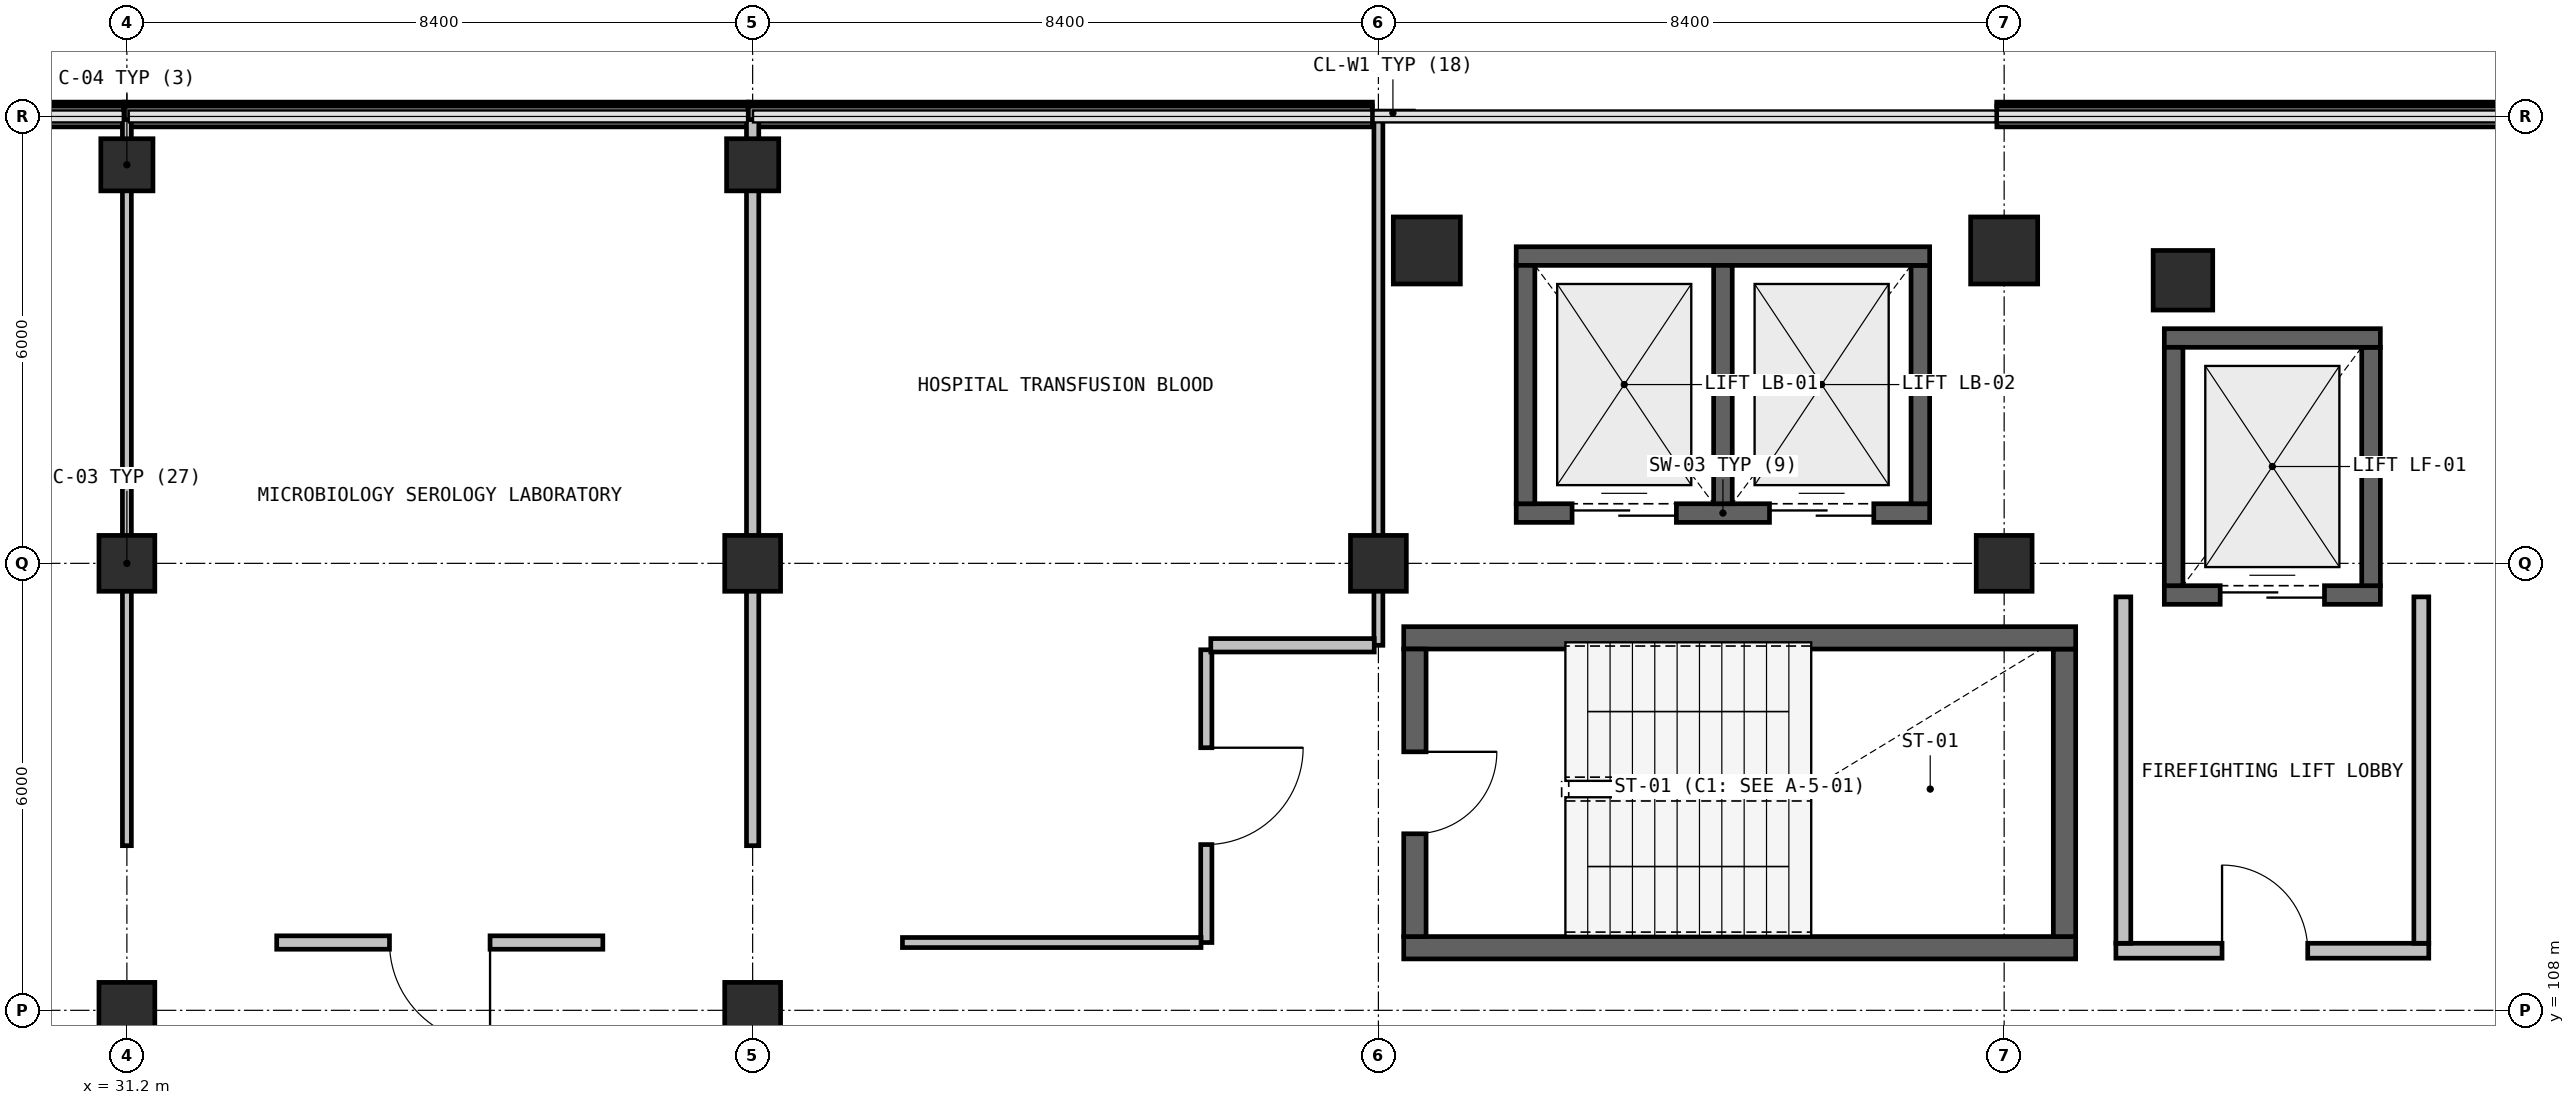
"""IFC4 building model, lengths in metres.
Left out: names, types, materials, properties, quantities, classifications, styles, units other than length and angle.
Written with IfcOpenShell. Run it as: python <this file> out.ifc"""

import sys

from ifc_helpers import new_model, si_unit, direction, frame, frame_2d, origin, origin_2d, place, context, subcontext, project, spatial, rectangle, extrude, element, fill, save


model = new_model("IFC4")
c1 = context("Model", 3, precision=1e-05, world=origin(), true_north=direction((0.0, 1.0)))
c2 = subcontext(c1, "Body", "Model", "MODEL_VIEW")
j1 = project(units=[si_unit("LENGTHUNIT", "METRE"), si_unit("PLANEANGLEUNIT", "RADIAN")], contexts=[c1])
p1 = place(None, origin())
s1 = spatial("IfcSite", under=j1, at=p1, CompositionType="ELEMENT")
p2 = place(p1, origin())
s2 = spatial("IfcBuilding", under=s1, at=p2, CompositionType="ELEMENT")
p3 = place(p2, frame((0.0, 0.0, 15.0)))
s3 = spatial("IfcBuildingStorey", under=s2, at=p3, CompositionType="ELEMENT", Elevation=15.0)
p4 = place(p3, frame((58.8, 117.8, 0.0), z_axis=(0.0, 0.0, 1.0), x_axis=(1.0, 0.0, 0.0)))
e1 = element("IfcColumn", 1, at=p4, inside=s3, PredefinedType="COLUMN", context=c2, shape_type="SweptSolid", body=[
    extrude(rectangle(XDim=0.8, YDim=0.8, at=origin_2d()), origin(), (0.0, 0.0, 1.0), 4.2),
])
for number, where, z_axis, x_axis in (
    (2, (48.65, 118.2, 0.0), (0.0, 0.0, 1.0), (1.0, 0.0, 0.0)),
    (3, (56.4, 118.2, 0.0), (0.0, 0.0, 1.0), (1.0, 0.0, 0.0)),
):
    element("IfcColumn", number, at=place(p3, frame(where, z_axis=z_axis, x_axis=x_axis)), inside=s3, PredefinedType="COLUMN", context=c2, shape_type="SweptSolid", body=[
        extrude(rectangle(XDim=0.9, YDim=0.9, at=origin_2d()), origin(), (0.0, 0.0, 1.0), 4.2),
    ])
for number, where, z_axis, x_axis in (
    (4, (31.2, 108.0, 0.0), (0.0, 0.0, 1.0), (1.0, 0.0, 0.0)),
    (5, (31.2, 114.0, 0.0), (0.0, 0.0, 1.0), (1.0, 0.0, 0.0)),
):
    element("IfcColumn", number, at=place(p3, frame(where, z_axis=z_axis, x_axis=x_axis)), inside=s3, PredefinedType="COLUMN", context=c2, shape_type="SweptSolid", body=[
        extrude(rectangle(XDim=0.75, YDim=0.75, at=origin_2d()), origin(), (0.0, 0.0, 1.0), 4.2),
    ])
p5 = place(p3, frame((31.2, 119.35, 0.0), z_axis=(0.0, 0.0, 1.0), x_axis=(1.0, 0.0, 0.0)))
e6 = element("IfcColumn", 6, at=p5, inside=s3, PredefinedType="COLUMN", context=c2, shape_type="SweptSolid", body=[
    extrude(rectangle(XDim=0.7, YDim=0.7, at=origin_2d()), origin(), (0.0, 0.0, 1.0), 4.2),
])
for number, where, z_axis, x_axis in (
    (7, (39.6, 108.0, 0.0), (0.0, 0.0, 1.0), (1.0, 0.0, 0.0)),
    (8, (39.6, 114.0, 0.0), (0.0, 0.0, 1.0), (1.0, 0.0, 0.0)),
):
    element("IfcColumn", number, at=place(p3, frame(where, z_axis=z_axis, x_axis=x_axis)), inside=s3, PredefinedType="COLUMN", context=c2, shape_type="SweptSolid", body=[
        extrude(rectangle(XDim=0.75, YDim=0.75, at=origin_2d()), origin(), (0.0, 0.0, 1.0), 4.2),
    ])
p6 = place(p3, frame((39.6, 119.35, 0.0), z_axis=(0.0, 0.0, 1.0), x_axis=(1.0, 0.0, 0.0)))
e9 = element("IfcColumn", 9, at=p6, inside=s3, PredefinedType="COLUMN", context=c2, shape_type="SweptSolid", body=[
    extrude(rectangle(XDim=0.7, YDim=0.7, at=origin_2d()), origin(), (0.0, 0.0, 1.0), 4.2),
])
for number, where, z_axis, x_axis in (
    (10, (48.0, 114.0, 0.0), (0.0, 0.0, 1.0), (1.0, 0.0, 0.0)),
    (11, (56.4, 114.0, 0.0), (0.0, 0.0, 1.0), (1.0, 0.0, 0.0)),
):
    element("IfcColumn", number, at=place(p3, frame(where, z_axis=z_axis, x_axis=x_axis)), inside=s3, PredefinedType="COLUMN", context=c2, shape_type="SweptSolid", body=[
        extrude(rectangle(XDim=0.75, YDim=0.75, at=origin_2d()), origin(), (0.0, 0.0, 1.0), 4.2),
    ])
for number, where, z_axis, x_axis in (
    (12, (22.782, 119.999, 0.0), (0.0, 0.0, 1.0), (1.0, 0.0, 0.0)),
    (13, (31.162, 119.999, 0.0), (0.0, 0.0, 1.0), (1.0, 0.0, 0.0)),
    (14, (39.542, 119.999, 0.0), (0.0, 0.0, 1.0), (1.0, 0.0, 0.0)),
    (15, (56.302, 119.999, 0.0), (0.0, 0.0, 1.0), (1.0, 0.0, 0.0)),
):
    element("IfcWall", number, at=place(p3, frame(where, z_axis=z_axis, x_axis=x_axis)), inside=s3, PredefinedType="SOLIDWALL", context=c2, shape_type="SweptSolid", body=[
        extrude(rectangle(XDim=8.376, YDim=0.28, at=frame_2d((4.188, 0.0))), origin(), (0.0, 0.0, 1.0), 0.94),
    ])
p7 = place(p3, frame((48.34, 108.84, 0.0), z_axis=(0.0, 0.0, 1.0), x_axis=(1.0, 0.0, 0.0)))
e16 = element("IfcWall", 16, at=p7, inside=s3, PredefinedType="SHEAR", context=c2, shape_type="SweptSolid", body=[
    extrude(rectangle(XDim=9.02, YDim=0.3, at=frame_2d((4.51, 0.0))), origin(), (0.0, 0.0, 1.0), 3.895),
])
p8 = place(p3, frame((57.21, 108.99, 0.0), z_axis=(0.0, 0.0, 1.0), x_axis=(0.0, 1.0, 0.0)))
e17 = element("IfcWall", 17, at=p8, inside=s3, PredefinedType="SHEAR", context=c2, shape_type="SweptSolid", body=[
    extrude(rectangle(XDim=3.86, YDim=0.3, at=frame_2d((1.93, 0.0))), origin(), (0.0, 0.0, 1.0), 3.895),
])
p9 = place(p3, frame((57.36, 113.0, 0.0), z_axis=(0.0, 0.0, 1.0), x_axis=(-1.0, 0.0, 0.0)))
e18 = element("IfcWall", 18, at=p9, inside=s3, PredefinedType="SHEAR", context=c2, shape_type="SweptSolid", body=[
    extrude(rectangle(XDim=9.02, YDim=0.3, at=frame_2d((4.51, 0.0))), origin(), (0.0, 0.0, 1.0), 3.895),
])
p10 = place(p3, frame((48.49, 112.85, 0.0), z_axis=(0.0, 0.0, 1.0), x_axis=(0.0, -1.0, 0.0)))
e19 = element("IfcWall", 19, at=p10, inside=s3, PredefinedType="SHEAR", context=c2, shape_type="SweptSolid", body=[
    extrude(rectangle(XDim=3.86, YDim=0.3, at=frame_2d((1.93, 0.0))), origin(), (0.0, 0.0, 1.0), 3.895),
])
p11 = place(p10, frame((1.38, 0.0, 0.0)))
e20 = element("IfcOpeningElement", 20, at=p11, cuts=e19, PredefinedType="OPENING", context=c2, shape_type="SweptSolid", body=[
    extrude(rectangle(XDim=1.1, YDim=2.15, at=frame_2d((0.55, 1.075))), frame((0.0, 0.16, 0.0), z_axis=(0.0, -1.0, 0.0), x_axis=(1.0, 0.0, 0.0)), (0.0, 0.0, 1.0), 0.32),
])
p12 = place(p3, frame((57.9, 108.8, 0.0), z_axis=(0.0, 0.0, 1.0), x_axis=(1.0, 0.0, 0.0)))
e21 = element("IfcWall", 21, at=p12, inside=s3, PredefinedType="SOLIDWALL", context=c2, shape_type="SweptSolid", body=[
    extrude(rectangle(XDim=4.2, YDim=0.2, at=frame_2d((2.1, 0.0))), origin(), (0.0, 0.0, 1.0), 3.895),
])
p13 = place(p12, frame((1.425, 0.0, 0.0)))
e22 = element("IfcOpeningElement", 22, at=p13, cuts=e21, PredefinedType="OPENING", context=c2, shape_type="SweptSolid", body=[
    extrude(rectangle(XDim=1.15, YDim=2.15, at=frame_2d((0.575, 1.075))), frame((0.0, 0.11, 0.0), z_axis=(0.0, -1.0, 0.0), x_axis=(1.0, 0.0, 0.0)), (0.0, 0.0, 1.0), 0.22),
])
for number, where, z_axis, x_axis in (
    (23, (62.0, 108.9, 0.0), (0.0, 0.0, 1.0), (0.0, 1.0, 0.0)),
    (24, (58.0, 113.55, 0.0), (0.0, 0.0, 1.0), (0.0, -1.0, 0.0)),
):
    element("IfcWall", number, at=place(p3, frame(where, z_axis=z_axis, x_axis=x_axis)), inside=s3, PredefinedType="SOLIDWALL", context=c2, shape_type="SweptSolid", body=[
        extrude(rectangle(XDim=4.65, YDim=0.2, at=frame_2d((2.325, 0.0))), origin(), (0.0, 0.0, 1.0), 3.895),
    ])
p14 = place(p3, frame((58.55, 113.575, 0.0), z_axis=(0.0, 0.0, 1.0), x_axis=(1.0, 0.0, 0.0)))
e25 = element("IfcWall", 25, at=p14, inside=s3, PredefinedType="SHEAR", context=c2, shape_type="SweptSolid", body=[
    extrude(rectangle(XDim=2.9, YDim=0.25, at=frame_2d((1.45, 0.0))), origin(), (0.0, 0.0, 1.0), 3.895),
])
p15 = place(p14, frame((0.75, 0.0, 0.0)))
e26 = element("IfcOpeningElement", 26, at=p15, cuts=e25, PredefinedType="OPENING", context=c2, shape_type="SweptSolid", body=[
    extrude(rectangle(XDim=1.4, YDim=2.15, at=frame_2d((0.7, 1.075))), frame((0.0, 0.135, 0.0), z_axis=(0.0, -1.0, 0.0), x_axis=(1.0, 0.0, 0.0)), (0.0, 0.0, 1.0), 0.27),
])
p16 = place(p3, frame((61.325, 113.7, 0.0), z_axis=(0.0, 0.0, 1.0), x_axis=(0.0, 1.0, 0.0)))
e27 = element("IfcWall", 27, at=p16, inside=s3, PredefinedType="SHEAR", context=c2, shape_type="SweptSolid", body=[
    extrude(rectangle(XDim=3.2, YDim=0.25, at=frame_2d((1.6, 0.0))), origin(), (0.0, 0.0, 1.0), 3.895),
])
p17 = place(p3, frame((61.45, 117.025, 0.0), z_axis=(0.0, 0.0, 1.0), x_axis=(-1.0, 0.0, 0.0)))
e28 = element("IfcWall", 28, at=p17, inside=s3, PredefinedType="SHEAR", context=c2, shape_type="SweptSolid", body=[
    extrude(rectangle(XDim=2.9, YDim=0.25, at=frame_2d((1.45, 0.0))), origin(), (0.0, 0.0, 1.0), 3.895),
])
p18 = place(p3, frame((58.675, 116.9, 0.0), z_axis=(0.0, 0.0, 1.0), x_axis=(0.0, -1.0, 0.0)))
e29 = element("IfcWall", 29, at=p18, inside=s3, PredefinedType="SHEAR", context=c2, shape_type="SweptSolid", body=[
    extrude(rectangle(XDim=3.2, YDim=0.25, at=frame_2d((1.6, 0.0))), origin(), (0.0, 0.0, 1.0), 3.895),
])
p19 = place(p3, frame((49.85, 114.675, 0.0), z_axis=(0.0, 0.0, 1.0), x_axis=(1.0, 0.0, 0.0)))
e30 = element("IfcWall", 30, at=p19, inside=s3, PredefinedType="SHEAR", context=c2, shape_type="SweptSolid", body=[
    extrude(rectangle(XDim=5.55, YDim=0.25, at=frame_2d((2.775, 0.0))), origin(), (0.0, 0.0, 1.0), 3.895),
])
p20 = place(p19, frame((0.75, 0.0, 0.0)))
e31 = element("IfcOpeningElement", 31, at=p20, cuts=e30, PredefinedType="OPENING", context=c2, shape_type="SweptSolid", body=[
    extrude(rectangle(XDim=1.4, YDim=2.2, at=frame_2d((0.7, 1.1))), frame((0.0, 0.135, 0.0), z_axis=(0.0, -1.0, 0.0), x_axis=(1.0, 0.0, 0.0)), (0.0, 0.0, 1.0), 0.27),
])
p21 = place(p19, frame((3.4, 0.0, 0.0)))
e32 = element("IfcOpeningElement", 32, at=p21, cuts=e30, PredefinedType="OPENING", context=c2, shape_type="SweptSolid", body=[
    extrude(rectangle(XDim=1.4, YDim=2.2, at=frame_2d((0.7, 1.1))), frame((0.0, 0.135, 0.0), z_axis=(0.0, -1.0, 0.0), x_axis=(1.0, 0.0, 0.0)), (0.0, 0.0, 1.0), 0.27),
])
p22 = place(p3, frame((55.275, 114.8, 0.0), z_axis=(0.0, 0.0, 1.0), x_axis=(0.0, 1.0, 0.0)))
e33 = element("IfcWall", 33, at=p22, inside=s3, PredefinedType="SHEAR", context=c2, shape_type="SweptSolid", body=[
    extrude(rectangle(XDim=3.2, YDim=0.25, at=frame_2d((1.6, 0.0))), origin(), (0.0, 0.0, 1.0), 3.895),
])
p23 = place(p3, frame((55.4, 118.125, 0.0), z_axis=(0.0, 0.0, 1.0), x_axis=(-1.0, 0.0, 0.0)))
e34 = element("IfcWall", 34, at=p23, inside=s3, PredefinedType="SHEAR", context=c2, shape_type="SweptSolid", body=[
    extrude(rectangle(XDim=5.55, YDim=0.25, at=frame_2d((2.775, 0.0))), origin(), (0.0, 0.0, 1.0), 3.895),
])
for number, where, z_axis, x_axis in (
    (35, (49.975, 118.0, 0.0), (0.0, 0.0, 1.0), (0.0, -1.0, 0.0)),
    (36, (52.625, 114.8, 0.0), (0.0, 0.0, 1.0), (0.0, 1.0, 0.0)),
):
    element("IfcWall", number, at=place(p3, frame(where, z_axis=z_axis, x_axis=x_axis)), inside=s3, PredefinedType="SHEAR", context=c2, shape_type="SweptSolid", body=[
        extrude(rectangle(XDim=3.2, YDim=0.25, at=frame_2d((1.6, 0.0))), origin(), (0.0, 0.0, 1.0), 3.895),
    ])
p24 = place(p3, frame((31.2, 119.957, 0.0), z_axis=(0.0, 0.0, 1.0), x_axis=(0.0, -1.0, 0.0)))
e37 = element("IfcWall", 37, at=p24, inside=s3, PredefinedType="PARTITIONING", context=c2, shape_type="SweptSolid", body=[
    extrude(rectangle(XDim=9.747, YDim=0.12, at=frame_2d((4.874, 0.0))), origin(), (0.0, 0.0, 1.0), 3.245),
])
p25 = place(p3, frame((37.589, 108.91, 0.0), z_axis=(0.0, 0.0, 1.0), x_axis=(-1.0, 0.0, 0.0)))
e38 = element("IfcWall", 38, at=p25, inside=s3, PredefinedType="PARTITIONING", context=c2, shape_type="SweptSolid", body=[
    extrude(rectangle(XDim=4.378, YDim=0.18, at=frame_2d((2.189, 0.0))), origin(), (0.0, 0.0, 1.0), 3.895),
])
p26 = place(p25, frame((1.514, 0.0, 0.0)))
e39 = element("IfcOpeningElement", 39, at=p26, cuts=e38, PredefinedType="OPENING", context=c2, shape_type="SweptSolid", body=[
    extrude(rectangle(XDim=1.35, YDim=2.15, at=frame_2d((0.675, 1.075))), frame((0.0, 0.1, 0.0), z_axis=(0.0, -1.0, 0.0), x_axis=(1.0, 0.0, 0.0)), (0.0, 0.0, 1.0), 0.2),
])
p27 = place(p3, frame((39.6, 119.957, 0.0), z_axis=(0.0, 0.0, 1.0), x_axis=(0.0, -1.0, 0.0)))
e40 = element("IfcWall", 40, at=p27, inside=s3, PredefinedType="PARTITIONING", context=c2, shape_type="SweptSolid", body=[
    extrude(rectangle(XDim=9.747, YDim=0.165, at=frame_2d((4.874, 0.0))), origin(), (0.0, 0.0, 1.0), 3.245),
])
p28 = place(p3, frame((45.69, 112.84, 0.0), z_axis=(0.0, 0.0, 1.0), x_axis=(0.0, -1.0, 0.0)))
e41 = element("IfcWall", 41, at=p28, inside=s3, PredefinedType="PARTITIONING", context=c2, shape_type="SweptSolid", body=[
    extrude(rectangle(XDim=3.93, YDim=0.15, at=frame_2d((1.965, 0.0))), origin(), (0.0, 0.0, 1.0), 3.895),
])
p29 = place(p28, frame((1.315, 0.0, 0.0)))
e42 = element("IfcOpeningElement", 42, at=p29, cuts=e41, PredefinedType="OPENING", context=c2, shape_type="SweptSolid", body=[
    extrude(rectangle(XDim=1.3, YDim=2.15, at=frame_2d((0.65, 1.075))), frame((0.0, 0.085, 0.0), z_axis=(0.0, -1.0, 0.0), x_axis=(1.0, 0.0, 0.0)), (0.0, 0.0, 1.0), 0.17),
])
p30 = place(p3, frame((45.619, 108.91, 0.0), z_axis=(0.0, 0.0, 1.0), x_axis=(-1.0, 0.0, 0.0)))
e43 = element("IfcWall", 43, at=p30, inside=s3, PredefinedType="PARTITIONING", context=c2, shape_type="SweptSolid", body=[
    extrude(rectangle(XDim=4.008, YDim=0.135, at=frame_2d((2.004, 0.0))), origin(), (0.0, 0.0, 1.0), 3.895),
])
p31 = place(p3, frame((48.0, 119.988, 0.0), z_axis=(0.0, 0.0, 1.0), x_axis=(0.0, -1.0, 0.0)))
e44 = element("IfcWall", 44, at=p31, inside=s3, PredefinedType="PARTITIONING", context=c2, shape_type="SweptSolid", body=[
    extrude(rectangle(XDim=7.088, YDim=0.12, at=frame_2d((3.544, 0.0))), origin(), (0.0, 0.0, 1.0), 3.245),
])
p32 = place(p3, frame((47.944, 112.9, 0.0), z_axis=(0.0, 0.0, 1.0), x_axis=(-1.0, 0.0, 0.0)))
e45 = element("IfcWall", 45, at=p32, inside=s3, PredefinedType="PARTITIONING", context=c2, shape_type="SweptSolid", body=[
    extrude(rectangle(XDim=2.194, YDim=0.18, at=frame_2d((1.097, 0.0))), origin(), (0.0, 0.0, 1.0), 3.895),
])
p33 = place(p11, origin())
e46 = element("IfcDoor", 46, at=p33, inside=s3, OperationType="SINGLE_SWING_LEFT", PredefinedType="DOOR", context=c2, shape_type="SweptSolid", body=[
    extrude(rectangle(XDim=1.1, YDim=2.15, at=frame_2d((0.55, 1.075))), frame((0.0, 0.025, 0.0), z_axis=(0.0, -1.0, 0.0), x_axis=(1.0, 0.0, 0.0)), (0.0, 0.0, 1.0), 0.05),
])
fill(e20, e46)
p34 = place(p13, origin())
e47 = element("IfcDoor", 47, at=p34, inside=s3, OperationType="SINGLE_SWING_RIGHT", PredefinedType="DOOR", context=c2, shape_type="SweptSolid", body=[
    extrude(rectangle(XDim=1.15, YDim=2.15, at=frame_2d((0.575, 1.075))), frame((0.0, 0.025, 0.0), z_axis=(0.0, -1.0, 0.0), x_axis=(1.0, 0.0, 0.0)), (0.0, 0.0, 1.0), 0.05),
])
fill(e22, e47)
p35 = place(p15, origin())
e48 = element("IfcDoor", 48, at=p35, inside=s3, OperationType="DOUBLE_DOOR_SLIDING", PredefinedType="DOOR", context=c2, shape_type="SweptSolid", body=[
    extrude(rectangle(XDim=1.4, YDim=2.15, at=frame_2d((0.7, 1.075))), frame((0.0, 0.025, 0.0), z_axis=(0.0, -1.0, 0.0), x_axis=(1.0, 0.0, 0.0)), (0.0, 0.0, 1.0), 0.05),
])
fill(e26, e48)
p36 = place(p20, origin())
e49 = element("IfcDoor", 49, at=p36, inside=s3, OperationType="DOUBLE_DOOR_SLIDING", PredefinedType="DOOR", context=c2, shape_type="SweptSolid", body=[
    extrude(rectangle(XDim=1.4, YDim=2.2, at=frame_2d((0.7, 1.1))), frame((0.0, 0.025, 0.0), z_axis=(0.0, -1.0, 0.0), x_axis=(1.0, 0.0, 0.0)), (0.0, 0.0, 1.0), 0.05),
])
fill(e31, e49)
p37 = place(p21, origin())
e50 = element("IfcDoor", 50, at=p37, inside=s3, OperationType="DOUBLE_DOOR_SLIDING", PredefinedType="DOOR", context=c2, shape_type="SweptSolid", body=[
    extrude(rectangle(XDim=1.4, YDim=2.2, at=frame_2d((0.7, 1.1))), frame((0.0, 0.025, 0.0), z_axis=(0.0, -1.0, 0.0), x_axis=(1.0, 0.0, 0.0)), (0.0, 0.0, 1.0), 0.05),
])
fill(e32, e50)
p38 = place(p26, origin())
e51 = element("IfcDoor", 51, at=p38, inside=s3, OperationType="SINGLE_SWING_LEFT", PredefinedType="DOOR", context=c2, shape_type="SweptSolid", body=[
    extrude(rectangle(XDim=1.35, YDim=2.15, at=frame_2d((0.675, 1.075))), frame((0.0, 0.025, 0.0), z_axis=(0.0, -1.0, 0.0), x_axis=(1.0, 0.0, 0.0)), (0.0, 0.0, 1.0), 0.05),
])
fill(e39, e51)
p39 = place(p29, origin())
e52 = element("IfcDoor", 52, at=p39, inside=s3, OperationType="SINGLE_SWING_RIGHT", PredefinedType="DOOR", context=c2, shape_type="SweptSolid", body=[
    extrude(rectangle(XDim=1.3, YDim=2.15, at=frame_2d((0.65, 1.075))), frame((0.0, 0.025, 0.0), z_axis=(0.0, -1.0, 0.0), x_axis=(1.0, 0.0, 0.0)), (0.0, 0.0, 1.0), 0.05),
])
fill(e42, e52)
save(model, sys.argv[1])
